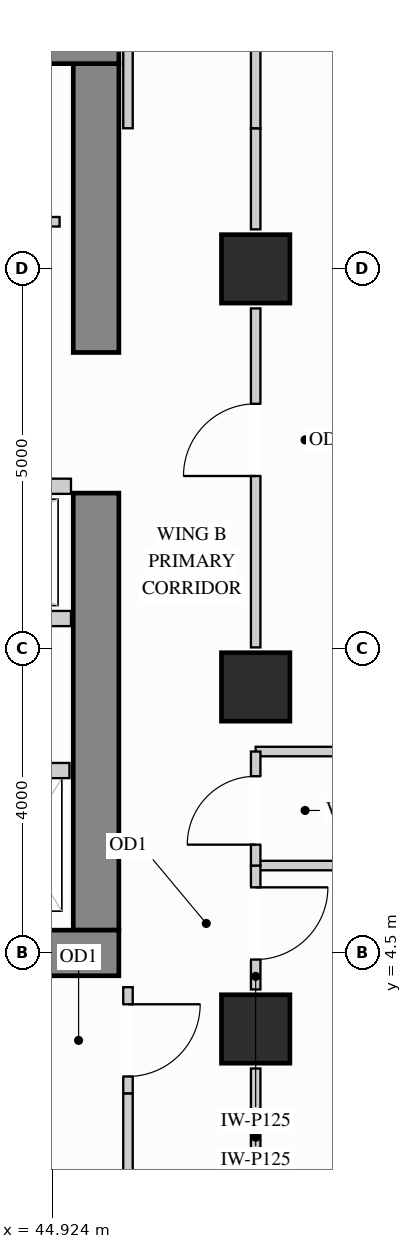
"""IFC4 building model, lengths in metres.
Left out: names, types, materials, properties, quantities, classifications, styles, units other than length and angle.
Written with IfcOpenShell. Run it as: python <this file> out.ifc"""

import sys

from ifc_helpers import new_model, si_unit, direction, frame, frame_2d, origin, origin_2d, place, context, subcontext, project, spatial, rectangle, extrude, source, transform, mapped, element, fill, save


model = new_model("IFC4")
c1 = context("Model", 3, precision=1e-05, world=origin(), true_north=direction((0.0, 1.0)))
c2 = subcontext(c1, "Body", "Model", "MODEL_VIEW")
j1 = project(units=[si_unit("LENGTHUNIT", "METRE"), si_unit("PLANEANGLEUNIT", "RADIAN")], contexts=[c1])
p1 = place(None, origin())
s1 = spatial("IfcSite", under=j1, at=p1, CompositionType="ELEMENT")
p2 = place(p1, origin())
s2 = spatial("IfcBuilding", under=s1, at=p2, CompositionType="ELEMENT")
p3 = place(p2, frame((0.0, 0.0, 200.7)))
s3 = spatial("IfcBuildingStorey", under=s2, at=p3, CompositionType="ELEMENT", Elevation=200.7)
m1 = source(origin(), c2, "Body", "SweptSolid", [
    extrude(rectangle(XDim=0.9, YDim=0.9, at=origin_2d()), origin(), (0.0, 0.0, 1.0), 3.4),
])
for number, where, z_axis, x_axis in (
    (1, (47.6, 13.5, 0.0), (0.0, 0.0, 1.0), (1.0, 0.0, 0.0)),
    (2, (47.6, 3.5, 0.0), (0.0, 0.0, 1.0), (1.0, 0.0, 0.0)),
    (3, (47.6, 8.0, 0.0), (0.0, 0.0, 1.0), (1.0, 0.0, 0.0)),
):
    element("IfcColumn", number, at=place(p3, frame(where, z_axis=z_axis, x_axis=x_axis)), inside=s3, PredefinedType="COLUMN", context=c2, shape_type="MappedRepresentation", body=[
        mapped(m1, transform((0.0, 0.0, 0.0), x_axis=(1.0, 0.0, 0.0), y_axis=(0.0, 1.0, 0.0), z_axis=(0.0, 0.0, 1.0))),
    ])
m2 = source(origin(), c2, "Body", "SweptSolid", [
    extrude(rectangle(XDim=5.75, YDim=0.6, at=frame_2d((2.875, 0.0))), origin(), (0.0, 0.0, 1.0), 3.4),
])
p4 = place(p3, frame((45.5, 4.8, 0.0), z_axis=(0.0, 0.0, 1.0), x_axis=(0.0, 1.0, 0.0)))
e4 = element("IfcWall", 4, at=p4, inside=s3, PredefinedType="SHEAR", context=c2, shape_type="MappedRepresentation", body=[
    mapped(m2, transform((0.0, 0.0, 0.0), x_axis=(1.0, 0.0, 0.0), y_axis=(0.0, 1.0, 0.0), z_axis=(0.0, 0.0, 1.0))),
])
m3 = source(origin(), c2, "Body", "SweptSolid", [
    extrude(rectangle(XDim=3.8, YDim=0.6, at=frame_2d((1.9, 0.0))), origin(), (0.0, 0.0, 1.0), 3.4),
])
p5 = place(p3, frame((45.5, 12.4, 0.0), z_axis=(0.0, 0.0, 1.0), x_axis=(0.0, 1.0, 0.0)))
e5 = element("IfcWall", 5, at=p5, inside=s3, PredefinedType="SHEAR", context=c2, shape_type="MappedRepresentation", body=[
    mapped(m3, transform((0.0, 0.0, 0.0), x_axis=(1.0, 0.0, 0.0), y_axis=(0.0, 1.0, 0.0), z_axis=(0.0, 0.0, 1.0))),
])
m4 = source(origin(), c2, "Body", "SweptSolid", [
    extrude(rectangle(XDim=10.1, YDim=0.6, at=frame_2d((5.05, 0.0))), origin(), (0.0, 0.0, 1.0), 3.4),
])
for number, where, z_axis, x_axis in (
    (6, (35.7, 16.5, 0.0), (0.0, 0.0, 1.0), (1.0, 0.0, 0.0)),
    (7, (35.7, 4.5, 0.0), (0.0, 0.0, 1.0), (1.0, 0.0, 0.0)),
):
    element("IfcWall", number, at=place(p3, frame(where, z_axis=z_axis, x_axis=x_axis)), inside=s3, PredefinedType="SHEAR", context=c2, shape_type="MappedRepresentation", body=[
        mapped(m4, transform((0.0, 0.0, 0.0), x_axis=(1.0, 0.0, 0.0), y_axis=(0.0, 1.0, 0.0), z_axis=(0.0, 0.0, 1.0))),
    ])
p6 = place(p3, frame((36.5, 14.12, 0.0), z_axis=(0.0, 0.0, 1.0), x_axis=(1.0, 0.0, 0.0)))
e8 = element("IfcWall", 8, at=p6, inside=s3, PredefinedType="PARTITIONING", context=c2, shape_type="SweptSolid", body=[
    extrude(rectangle(XDim=8.52, YDim=0.125, at=frame_2d((4.26, 0.0))), origin(), (0.0, 0.0, 1.0), 3.385),
])
p7 = place(p6, frame((3.785, 0.0, 0.0)))
e9 = element("IfcOpeningElement", 9, at=p7, cuts=e8, PredefinedType="OPENING", context=c2, shape_type="SweptSolid", body=[
    extrude(rectangle(XDim=0.95, YDim=2.15, at=frame_2d((0.475, 1.075))), frame((0.0, 0.073, 0.0), z_axis=(0.0, -1.0, 0.0), x_axis=(1.0, 0.0, 0.0)), (0.0, 0.0, 1.0), 0.145),
])
m5 = source(origin(), c2, "Body", "SweptSolid", [
    extrude(rectangle(XDim=5.048, YDim=0.125, at=frame_2d((2.524, 0.0))), origin(), (0.0, 0.0, 1.0), 3.385),
])
for number, where, z_axis, x_axis in (
    (10, (47.6, 5.65, 0.0), (0.0, 0.0, 1.0), (1.0, 0.0, 0.0)),
    (11, (47.6, 7.15, 0.0), (0.0, 0.0, 1.0), (1.0, 0.0, 0.0)),
):
    element("IfcWall", number, at=place(p3, frame(where, z_axis=z_axis, x_axis=x_axis)), inside=s3, PredefinedType="PARTITIONING", context=c2, shape_type="MappedRepresentation", body=[
        mapped(m5, transform((0.0, 0.0, 0.0), x_axis=(1.0, 0.0, 0.0), y_axis=(0.0, 1.0, 0.0), z_axis=(0.0, 0.0, 1.0))),
    ])
p8 = place(p3, frame((47.6, 4.02, 0.0), z_axis=(0.0, 0.0, 1.0), x_axis=(0.0, 1.0, 0.0)))
e12 = element("IfcWall", 12, at=p8, inside=s3, PredefinedType="PARTITIONING", context=c2, shape_type="SweptSolid", body=[
    extrude(rectangle(XDim=1.63, YDim=0.125, at=frame_2d((0.815, 0.0))), origin(), (0.0, 0.0, 1.0), 2.773),
])
p9 = place(p8, frame((0.393, 0.0, 0.0)))
e13 = element("IfcOpeningElement", 13, at=p9, cuts=e12, PredefinedType="OPENING", context=c2, shape_type="SweptSolid", body=[
    extrude(rectangle(XDim=0.95, YDim=2.15, at=frame_2d((0.475, 1.075))), frame((0.0, 0.073, 0.0), z_axis=(0.0, -1.0, 0.0), x_axis=(1.0, 0.0, 0.0)), (0.0, 0.0, 1.0), 0.145),
])
m6 = source(origin(), c2, "Body", "SweptSolid", [
    extrude(rectangle(XDim=1.86, YDim=0.125, at=frame_2d((0.93, 0.0))), origin(), (0.0, 0.0, 1.0), 2.773),
])
p10 = place(p3, frame((47.6, 1.12, 0.0), z_axis=(0.0, 0.0, 1.0), x_axis=(0.0, 1.0, 0.0)))
e14 = element("IfcWall", 14, at=p10, inside=s3, PredefinedType="PARTITIONING", context=c2, shape_type="MappedRepresentation", body=[
    mapped(m6, transform((0.0, 0.0, 0.0), x_axis=(1.0, 0.0, 0.0), y_axis=(0.0, 1.0, 0.0), z_axis=(0.0, 0.0, 1.0))),
])
p11 = place(p3, frame((47.6, 8.52, 0.0), z_axis=(0.0, 0.0, 1.0), x_axis=(0.0, 1.0, 0.0)))
e15 = element("IfcWall", 15, at=p11, inside=s3, PredefinedType="PARTITIONING", context=c2, shape_type="SweptSolid", body=[
    extrude(rectangle(XDim=4.46, YDim=0.125, at=frame_2d((2.23, 0.0))), origin(), (0.0, 0.0, 1.0), 2.773),
])
p12 = place(p11, frame((2.255, 0.0, 0.0)))
e16 = element("IfcOpeningElement", 16, at=p12, cuts=e15, PredefinedType="OPENING", context=c2, shape_type="SweptSolid", body=[
    extrude(rectangle(XDim=0.95, YDim=2.15, at=frame_2d((0.475, 1.075))), frame((0.0, 0.073, 0.0), z_axis=(0.0, -1.0, 0.0), x_axis=(1.0, 0.0, 0.0)), (0.0, 0.0, 1.0), 0.145),
])
m7 = source(origin(), c2, "Body", "SweptSolid", [
    extrude(rectangle(XDim=1.33, YDim=0.125, at=frame_2d((0.665, 0.0))), origin(), (0.0, 0.0, 1.0), 2.773),
])
p13 = place(p3, frame((47.6, 14.02, 0.0), z_axis=(0.0, 0.0, 1.0), x_axis=(0.0, 1.0, 0.0)))
e17 = element("IfcWall", 17, at=p13, inside=s3, PredefinedType="PARTITIONING", context=c2, shape_type="MappedRepresentation", body=[
    mapped(m7, transform((0.0, 0.0, 0.0), x_axis=(1.0, 0.0, 0.0), y_axis=(0.0, 1.0, 0.0), z_axis=(0.0, 0.0, 1.0))),
])
m8 = source(origin(), c2, "Body", "SweptSolid", [
    extrude(rectangle(XDim=1.53, YDim=0.125, at=frame_2d((0.765, 0.0))), origin(), (0.0, 0.0, 1.0), 2.773),
])
p14 = place(p3, frame((47.6, 15.35, 0.0), z_axis=(0.0, 0.0, 1.0), x_axis=(0.0, 1.0, 0.0)))
e18 = element("IfcWall", 18, at=p14, inside=s3, PredefinedType="PARTITIONING", context=c2, shape_type="MappedRepresentation", body=[
    mapped(m8, transform((0.0, 0.0, 0.0), x_axis=(1.0, 0.0, 0.0), y_axis=(0.0, 1.0, 0.0), z_axis=(0.0, 0.0, 1.0))),
])
p15 = place(p3, frame((47.6, 5.65, 0.0), z_axis=(0.0, 0.0, 1.0), x_axis=(0.0, 1.0, 0.0)))
e19 = element("IfcWall", 19, at=p15, inside=s3, PredefinedType="PARTITIONING", context=c2, shape_type="SweptSolid", body=[
    extrude(rectangle(XDim=1.5, YDim=0.125, at=frame_2d((0.75, 0.0))), origin(), (0.0, 0.0, 1.0), 2.773),
])
p16 = place(p15, frame((0.275, 0.0, 0.0)))
e20 = element("IfcOpeningElement", 20, at=p16, cuts=e19, PredefinedType="OPENING", context=c2, shape_type="SweptSolid", body=[
    extrude(rectangle(XDim=0.9, YDim=2.15, at=frame_2d((0.45, 1.075))), frame((0.0, 0.073, 0.0), z_axis=(0.0, -1.0, 0.0), x_axis=(1.0, 0.0, 0.0)), (0.0, 0.0, 1.0), 0.145),
])
m9 = source(origin(), c2, "Body", "SweptSolid", [
    extrude(rectangle(XDim=2.298, YDim=0.125, at=frame_2d((1.149, 0.0))), origin(), (0.0, 0.0, 1.0), 3.385),
])
p17 = place(p3, frame((45.92, 15.35, 0.0), z_axis=(0.0, 0.0, 1.0), x_axis=(0.0, 1.0, 0.0)))
e21 = element("IfcWall", 21, at=p17, inside=s3, PredefinedType="PARTITIONING", context=c2, shape_type="MappedRepresentation", body=[
    mapped(m9, transform((0.0, 0.0, 0.0), x_axis=(1.0, 0.0, 0.0), y_axis=(0.0, 1.0, 0.0), z_axis=(0.0, 0.0, 1.0))),
])
p18 = place(p3, frame((45.92, 2.65, 0.0), z_axis=(0.0, 0.0, 1.0), x_axis=(0.0, 1.0, 0.0)))
e22 = element("IfcWall", 22, at=p18, inside=s3, PredefinedType="PARTITIONING", context=c2, shape_type="SweptSolid", body=[
    extrude(rectangle(XDim=1.4, YDim=0.125, at=frame_2d((0.7, 0.0))), origin(), (0.0, 0.0, 1.0), 3.385),
])
p19 = place(p18, frame((0.225, 0.0, 0.0)))
e23 = element("IfcOpeningElement", 23, at=p19, cuts=e22, PredefinedType="OPENING", context=c2, shape_type="SweptSolid", body=[
    extrude(rectangle(XDim=0.95, YDim=2.15, at=frame_2d((0.475, 1.075))), frame((0.0, 0.073, 0.0), z_axis=(0.0, -1.0, 0.0), x_axis=(1.0, 0.0, 0.0)), (0.0, 0.0, 1.0), 0.145),
])
p20 = place(p3, frame((45.92, 0.352, 0.0), z_axis=(0.0, 0.0, 1.0), x_axis=(0.0, 1.0, 0.0)))
e24 = element("IfcWall", 24, at=p20, inside=s3, PredefinedType="PARTITIONING", context=c2, shape_type="MappedRepresentation", body=[
    mapped(m9, transform((0.0, 0.0, 0.0), x_axis=(1.0, 0.0, 0.0), y_axis=(0.0, 1.0, 0.0), z_axis=(0.0, 0.0, 1.0))),
])
m10 = source(origin(), c2, "Body", "SweptSolid", [
    extrude(rectangle(XDim=1.3, YDim=0.2, at=frame_2d((0.65, 0.0))), origin(), (0.0, 0.0, 1.0), 3.385),
])
p21 = place(p3, frame((43.85, 6.9, 0.0), z_axis=(0.0, 0.0, 1.0), x_axis=(1.0, 0.0, 0.0)))
e25 = element("IfcWall", 25, at=p21, inside=s3, PredefinedType="PARTITIONING", context=c2, shape_type="MappedRepresentation", body=[
    mapped(m10, transform((0.0, 0.0, 0.0), x_axis=(1.0, 0.0, 0.0), y_axis=(0.0, 1.0, 0.0), z_axis=(0.0, 0.0, 1.0))),
])
m11 = source(origin(), c2, "Body", "SweptSolid", [
    extrude(rectangle(XDim=3.49, YDim=0.2, at=frame_2d((1.745, 0.0))), origin(), (0.0, 0.0, 1.0), 3.385),
])
for number, where, z_axis, x_axis in (
    (26, (41.68, 10.64, 0.0), (0.0, 0.0, 1.0), (1.0, 0.0, 0.0)),
    (27, (41.68, 8.9, 0.0), (0.0, 0.0, 1.0), (1.0, 0.0, 0.0)),
):
    element("IfcWall", number, at=place(p3, frame(where, z_axis=z_axis, x_axis=x_axis)), inside=s3, PredefinedType="PARTITIONING", context=c2, shape_type="MappedRepresentation", body=[
        mapped(m11, transform((0.0, 0.0, 0.0), x_axis=(1.0, 0.0, 0.0), y_axis=(0.0, 1.0, 0.0), z_axis=(0.0, 0.0, 1.0))),
    ])
m12 = source(origin(), c2, "Body", "SweptSolid", [
    extrude(rectangle(XDim=0.95, YDim=2.15, at=frame_2d((0.475, 1.075))), frame((0.0, 0.025, 0.0), z_axis=(0.0, -1.0, 0.0), x_axis=(1.0, 0.0, 0.0)), (0.0, 0.0, 1.0), 0.05),
])
p22 = place(p19, origin())
e28 = element("IfcDoor", 28, at=p22, inside=s3, OperationType="SINGLE_SWING_RIGHT", PredefinedType="DOOR", context=c2, shape_type="MappedRepresentation", body=[
    mapped(m12, transform((0.0, 0.0, 0.0), x_axis=(1.0, 0.0, 0.0), y_axis=(0.0, 1.0, 0.0), z_axis=(0.0, 0.0, 1.0))),
])
fill(e23, e28)
p23 = place(p9, origin())
e29 = element("IfcDoor", 29, at=p23, inside=s3, OperationType="SINGLE_SWING_RIGHT", PredefinedType="DOOR", context=c2, shape_type="MappedRepresentation", body=[
    mapped(m12, transform((0.0, 0.0, 0.0), x_axis=(1.0, 0.0, 0.0), y_axis=(0.0, 1.0, 0.0), z_axis=(0.0, 0.0, 1.0))),
])
fill(e13, e29)
p24 = place(p12, origin())
e30 = element("IfcDoor", 30, at=p24, inside=s3, OperationType="SINGLE_SWING_LEFT", PredefinedType="DOOR", context=c2, shape_type="MappedRepresentation", body=[
    mapped(m12, transform((0.0, 0.0, 0.0), x_axis=(1.0, 0.0, 0.0), y_axis=(0.0, 1.0, 0.0), z_axis=(0.0, 0.0, 1.0))),
])
fill(e16, e30)
m13 = source(origin(), c2, "Body", "SweptSolid", [
    extrude(rectangle(XDim=0.9, YDim=2.15, at=frame_2d((0.45, 1.075))), frame((0.0, 0.025, 0.0), z_axis=(0.0, -1.0, 0.0), x_axis=(1.0, 0.0, 0.0)), (0.0, 0.0, 1.0), 0.05),
])
p25 = place(p16, origin())
e31 = element("IfcDoor", 31, at=p25, inside=s3, OperationType="SINGLE_SWING_LEFT", PredefinedType="DOOR", context=c2, shape_type="MappedRepresentation", body=[
    mapped(m13, transform((0.0, 0.0, 0.0), x_axis=(1.0, 0.0, 0.0), y_axis=(0.0, 1.0, 0.0), z_axis=(0.0, 0.0, 1.0))),
])
fill(e20, e31)
save(model, sys.argv[1])
